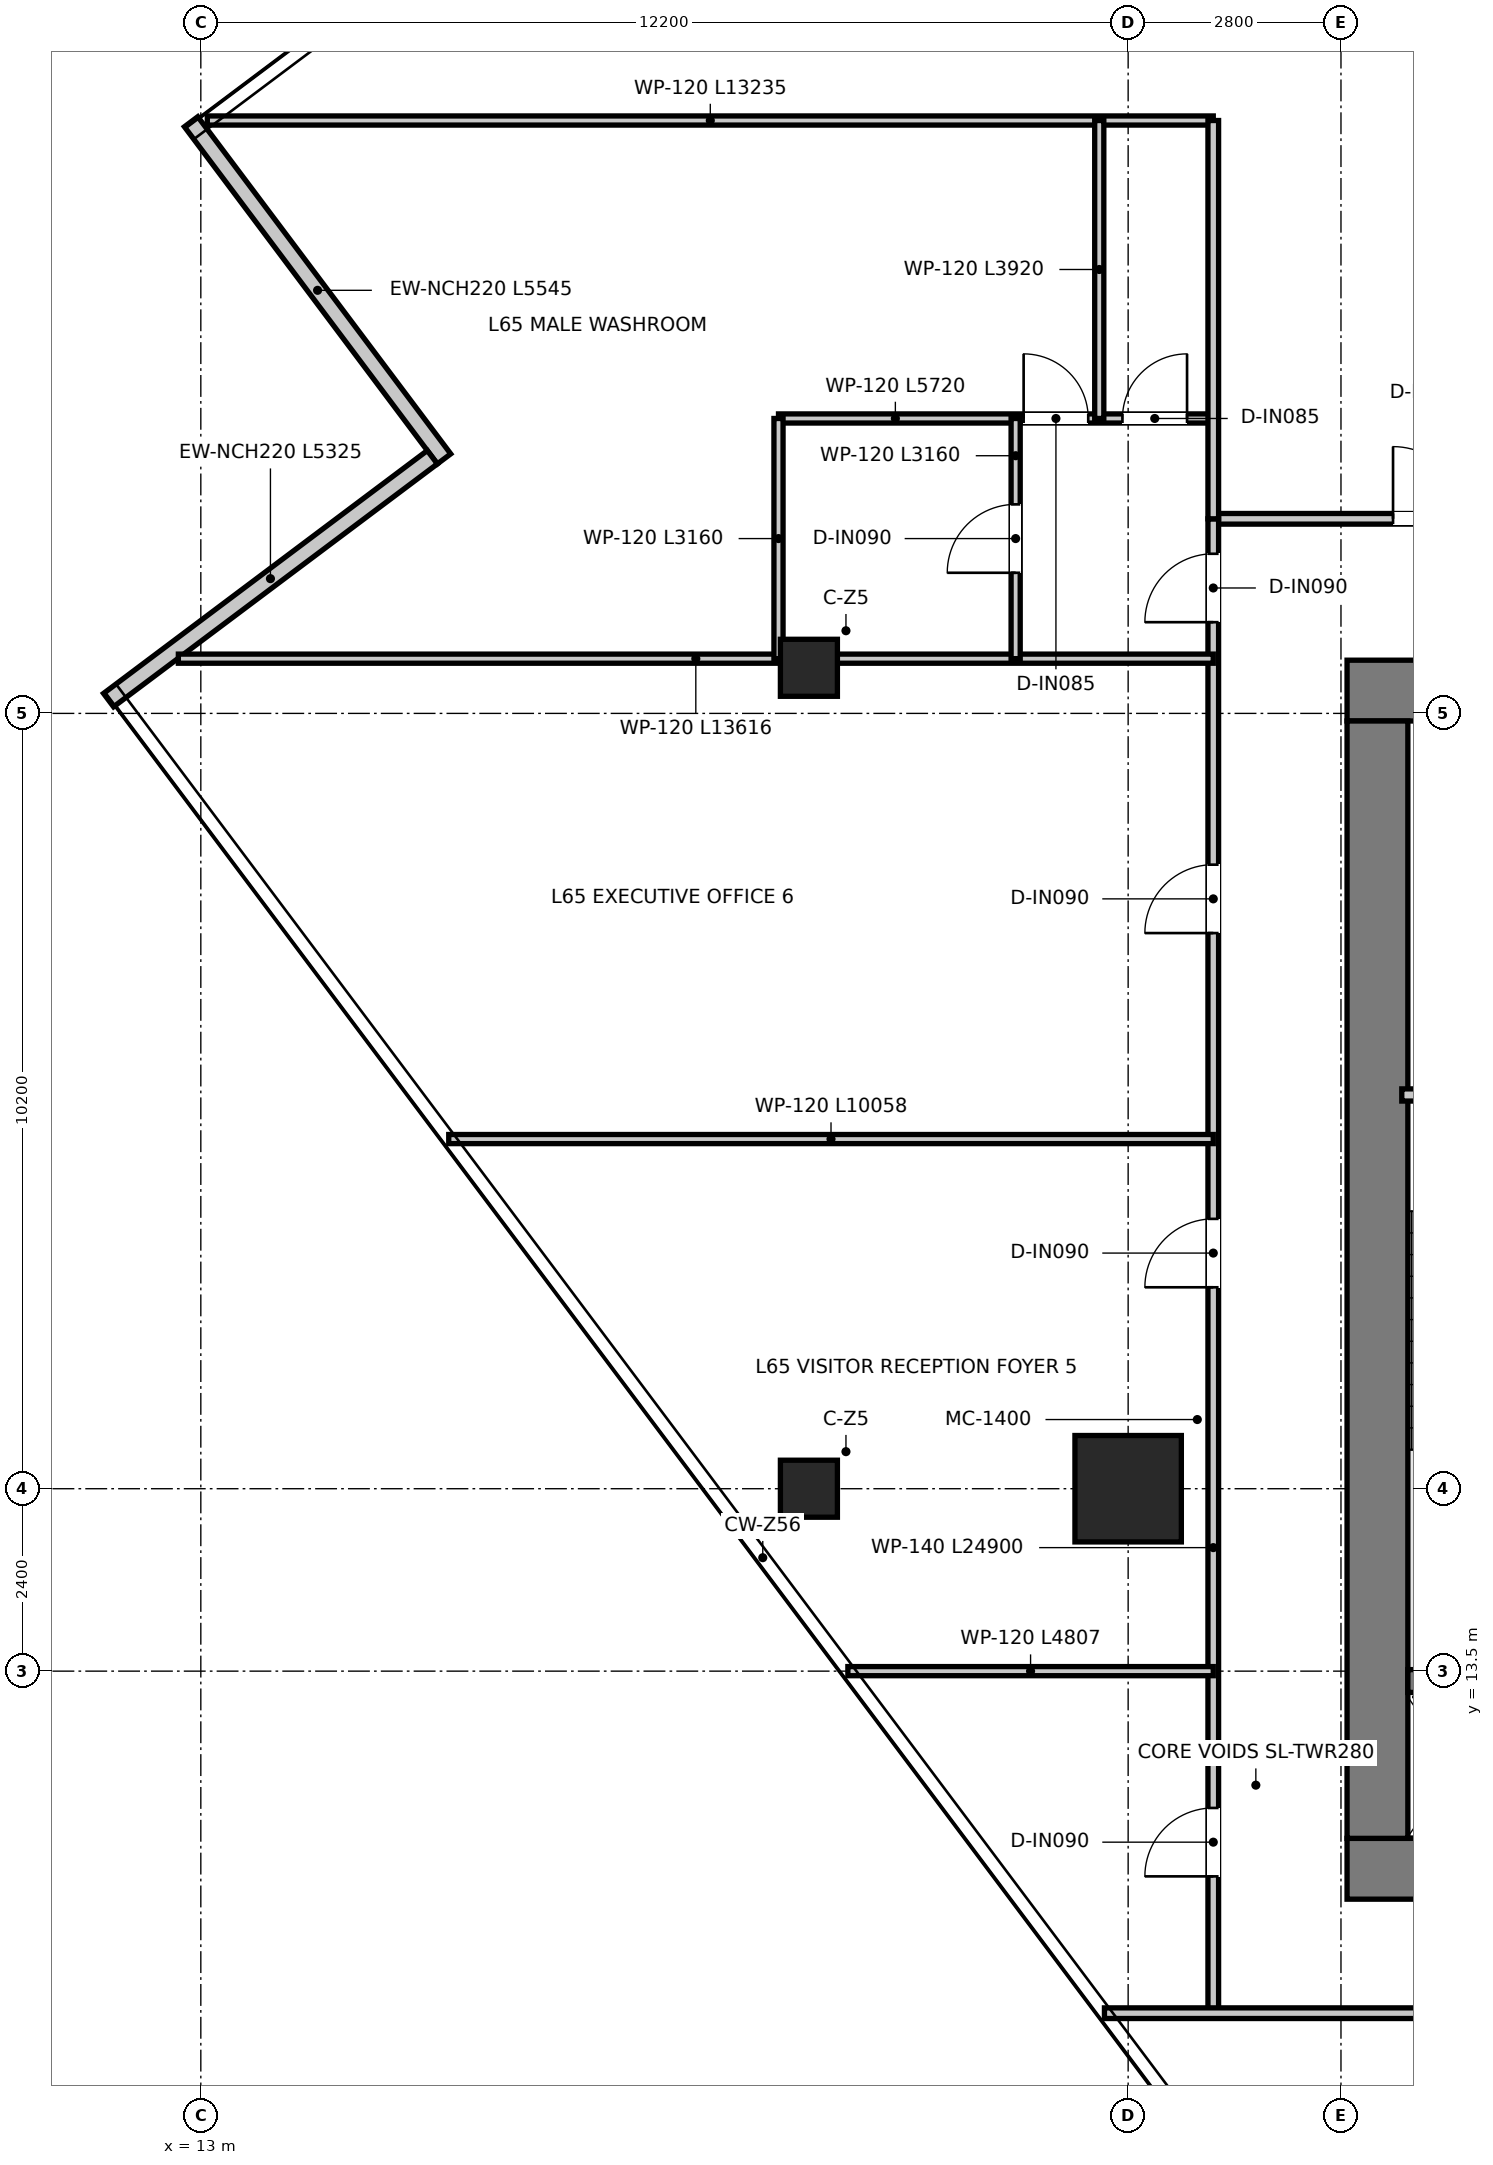
"""IFC4 building model, lengths in metres.
Left out: names, types, materials, properties, quantities, classifications, styles, units other than length and angle.
Written with IfcOpenShell. Run it as: python <this file> out.ifc"""

import sys

from ifc_helpers import new_model, si_unit, direction, frame, frame_2d, origin, origin_2d, place, context, subcontext, project, spatial, rectangle, extrude, source, transform, mapped, element, fill, save


model = new_model("IFC4")
c1 = context("Model", 3, precision=1e-05, world=origin(), true_north=direction((0.0, 1.0)))
c2 = subcontext(c1, "Body", "Model", "MODEL_VIEW")
j1 = project(units=[si_unit("LENGTHUNIT", "METRE"), si_unit("PLANEANGLEUNIT", "RADIAN")], contexts=[c1])
p1 = place(None, origin())
s1 = spatial("IfcSite", under=j1, at=p1, CompositionType="ELEMENT")
p2 = place(p1, origin())
s2 = spatial("IfcBuilding", under=s1, at=p2, CompositionType="ELEMENT")
p3 = place(p2, frame((0.0, 0.0, 267.4)))
s3 = spatial("IfcBuildingStorey", under=s2, at=p3, CompositionType="ELEMENT", Elevation=267.4)
p4 = place(p3, frame((28.08, 10.9, 0.0), z_axis=(0.0, 0.0, 1.0), x_axis=(1.0, 0.0, 0.0)))
e1 = element("IfcWall", 1, at=p4, inside=s3, PredefinedType="SHEAR", context=c2, shape_type="SweptSolid", body=[
    extrude(rectangle(XDim=15.84, YDim=0.8, at=frame_2d((7.92, 0.0))), origin(), (0.0, 0.0, 1.0), 3.95),
])
p5 = place(p3, frame((28.08, 26.4, 0.0), z_axis=(0.0, 0.0, 1.0), x_axis=(1.0, 0.0, 0.0)))
e2 = element("IfcWall", 2, at=p5, inside=s3, PredefinedType="SHEAR", context=c2, shape_type="SweptSolid", body=[
    extrude(rectangle(XDim=15.84, YDim=0.8, at=frame_2d((7.92, 0.0))), origin(), (0.0, 0.0, 1.0), 3.95),
])
p6 = place(p5, frame((7.22, 0.0, 0.0)))
e3 = element("IfcOpeningElement", 3, at=p6, cuts=e2, PredefinedType="OPENING", context=c2, shape_type="SweptSolid", body=[
    extrude(rectangle(XDim=1.4, YDim=2.2, at=frame_2d((0.7, 1.1))), frame((0.0, 0.41, 0.0), z_axis=(0.0, -1.0, 0.0), x_axis=(1.0, 0.0, 0.0)), (0.0, 0.0, 1.0), 0.82),
])
p7 = place(p5, frame((1.775, 0.0, 0.0)))
e4 = element("IfcOpeningElement", 4, at=p7, cuts=e2, PredefinedType="OPENING", context=c2, shape_type="SweptSolid", body=[
    extrude(rectangle(XDim=1.05, YDim=2.1, at=frame_2d((0.525, 1.05))), frame((0.0, 0.41, 0.0), z_axis=(0.0, -1.0, 0.0), x_axis=(1.0, 0.0, 0.0)), (0.0, 0.0, 1.0), 0.82),
])
p8 = place(p5, frame((13.015, 0.0, 0.0)))
e5 = element("IfcOpeningElement", 5, at=p8, cuts=e2, PredefinedType="OPENING", context=c2, shape_type="SweptSolid", body=[
    extrude(rectangle(XDim=1.05, YDim=2.1, at=frame_2d((0.525, 1.05))), frame((0.0, 0.41, 0.0), z_axis=(0.0, -1.0, 0.0), x_axis=(1.0, 0.0, 0.0)), (0.0, 0.0, 1.0), 0.82),
])
p9 = place(p3, frame((28.48, 11.3, 0.0), z_axis=(0.0, 0.0, 1.0), x_axis=(0.0, 1.0, 0.0)))
e6 = element("IfcWall", 6, at=p9, inside=s3, PredefinedType="SHEAR", context=c2, shape_type="SweptSolid", body=[
    extrude(rectangle(XDim=14.7, YDim=0.8, at=frame_2d((7.35, 0.0))), origin(), (0.0, 0.0, 1.0), 3.95),
])
p10 = place(p3, frame((28.88, 13.37, 0.0), z_axis=(0.0, 0.0, 1.0), x_axis=(1.0, 0.0, 0.0)))
e7 = element("IfcWall", 7, at=p10, inside=s3, PredefinedType="SHEAR", context=c2, shape_type="SweptSolid", body=[
    extrude(rectangle(XDim=3.1, YDim=0.3, at=frame_2d((1.55, 0.0))), origin(), (0.0, 0.0, 1.0), 3.95),
])
m1 = source(origin(), c2, "Body", "SweptSolid", [
    extrude(rectangle(XDim=1.4, YDim=1.4, at=origin_2d()), origin(), (0.0, 0.0, 1.0), 3.95),
])
p11 = place(p3, frame((25.2, 15.9, 0.0), z_axis=(0.0, 0.0, 1.0), x_axis=(1.0, 0.0, 0.0)))
e8 = element("IfcColumn", 8, at=p11, inside=s3, PredefinedType="USERDEFINED", context=c2, shape_type="MappedRepresentation", body=[
    mapped(m1, transform((0.0, 0.0, 0.0), x_axis=(1.0, 0.0, 0.0), y_axis=(0.0, 1.0, 0.0), z_axis=(0.0, 0.0, 1.0), scale=1.0)),
])
m2 = source(origin(), c2, "Body", "SweptSolid", [
    extrude(rectangle(XDim=0.75, YDim=0.75, at=origin_2d()), origin(), (0.0, 0.0, 1.0), 3.95),
])
for number, where, z_axis, x_axis in (
    (9, (21.0, 15.9, 0.0), (0.0, 0.0, 1.0), (1.0, 0.0, 0.0)),
    (10, (21.0, 26.7, 0.0), (0.0, 0.0, 1.0), (1.0, 0.0, 0.0)),
):
    element("IfcColumn", number, at=place(p3, frame(where, z_axis=z_axis, x_axis=x_axis)), inside=s3, PredefinedType="COLUMN", context=c2, shape_type="MappedRepresentation", body=[
        mapped(m2, transform((0.0, 0.0, 0.0), x_axis=(1.0, 0.0, 0.0), y_axis=(0.0, 1.0, 0.0), z_axis=(0.0, 0.0, 1.0), scale=1.0)),
    ])
p12 = place(p3, frame((12.872, 33.884, 0.0), z_axis=(0.0, 0.0, 1.0), x_axis=(0.600063399047, -0.799952446789, 0.0)))
e11 = element("IfcWall", 11, at=p12, inside=s3, PredefinedType="ELEMENTEDWALL", context=c2, shape_type="SweptSolid", body=[
    extrude(rectangle(XDim=5.545, YDim=0.22, at=frame_2d((2.772, 0.0))), origin(), (0.0, 0.0, 1.0), 3.67),
])
p13 = place(p3, frame((16.046, 29.47, 0.0), z_axis=(0.0, 0.0, 1.0), x_axis=(-0.799939474344, -0.600080692395, 0.0)))
e12 = element("IfcWall", 12, at=p13, inside=s3, PredefinedType="ELEMENTEDWALL", context=c2, shape_type="SweptSolid", body=[
    extrude(rectangle(XDim=5.325, YDim=0.22, at=frame_2d((2.662, 0.0))), origin(), (0.0, 0.0, 1.0), 3.67),
])
p14 = place(p3, frame((28.8, 21.08, 0.0), z_axis=(0.0, 0.0, 1.0), x_axis=(1.0, 0.0, 0.0)))
e13 = element("IfcWall", 13, at=p14, inside=s3, PredefinedType="PARTITIONING", context=c2, shape_type="SweptSolid", body=[
    extrude(rectangle(XDim=3.16, YDim=0.16, at=frame_2d((1.58, 0.0))), origin(), (0.0, 0.0, 1.0), 3.67),
])
p15 = place(p14, frame((1.055, 0.0, 0.0)))
e14 = element("IfcOpeningElement", 14, at=p15, cuts=e13, PredefinedType="OPENING", context=c2, shape_type="SweptSolid", body=[
    extrude(rectangle(XDim=1.05, YDim=2.1, at=frame_2d((0.525, 1.05))), frame((0.0, 0.09, 0.0), z_axis=(0.0, -1.0, 0.0), x_axis=(1.0, 0.0, 0.0)), (0.0, 0.0, 1.0), 0.18),
])
p16 = place(p3, frame((26.32, 28.66, 0.0), z_axis=(0.0, 0.0, 1.0), x_axis=(1.0, 0.0, 0.0)))
e15 = element("IfcWall", 15, at=p16, inside=s3, PredefinedType="PARTITIONING", context=c2, shape_type="SweptSolid", body=[
    extrude(rectangle(XDim=19.36, YDim=0.14, at=frame_2d((9.68, 0.0))), origin(), (0.0, 0.0, 1.0), 3.18),
])
p17 = place(p16, frame((2.365, 0.0, 0.0)))
e16 = element("IfcOpeningElement", 16, at=p17, cuts=e15, PredefinedType="OPENING", context=c2, shape_type="SweptSolid", body=[
    extrude(rectangle(XDim=0.95, YDim=2.1, at=frame_2d((0.475, 1.05))), frame((0.0, 0.08, 0.0), z_axis=(0.0, -1.0, 0.0), x_axis=(1.0, 0.0, 0.0)), (0.0, 0.0, 1.0), 0.16),
])
p18 = place(p16, frame((9.205, 0.0, 0.0)))
e17 = element("IfcOpeningElement", 17, at=p18, cuts=e15, PredefinedType="OPENING", context=c2, shape_type="SweptSolid", body=[
    extrude(rectangle(XDim=0.95, YDim=2.1, at=frame_2d((0.475, 1.05))), frame((0.0, 0.08, 0.0), z_axis=(0.0, -1.0, 0.0), x_axis=(1.0, 0.0, 0.0)), (0.0, 0.0, 1.0), 0.16),
])
p19 = place(p16, frame((16.045, 0.0, 0.0)))
e18 = element("IfcOpeningElement", 18, at=p19, cuts=e15, PredefinedType="OPENING", context=c2, shape_type="SweptSolid", body=[
    extrude(rectangle(XDim=0.95, YDim=2.1, at=frame_2d((0.475, 1.05))), frame((0.0, 0.08, 0.0), z_axis=(0.0, -1.0, 0.0), x_axis=(1.0, 0.0, 0.0)), (0.0, 0.0, 1.0), 0.16),
])
p20 = place(p3, frame((26.32, 9.0, 0.0), z_axis=(0.0, 0.0, 1.0), x_axis=(0.0, 1.0, 0.0)))
e19 = element("IfcWall", 19, at=p20, inside=s3, PredefinedType="PARTITIONING", context=c2, shape_type="SweptSolid", body=[
    extrude(rectangle(XDim=19.66, YDim=0.14, at=frame_2d((9.83, 0.0))), origin(), (0.0, 0.0, 1.0), 3.13),
])
p21 = place(p20, frame((18.3, 0.0, 0.0)))
e20 = element("IfcOpeningElement", 20, at=p21, cuts=e19, PredefinedType="OPENING", context=c2, shape_type="SweptSolid", body=[
    extrude(rectangle(XDim=0.9, YDim=2.1, at=frame_2d((0.45, 1.05))), frame((0.0, 0.08, 0.0), z_axis=(0.0, -1.0, 0.0), x_axis=(1.0, 0.0, 0.0)), (0.0, 0.0, 1.0), 0.16),
])
p22 = place(p20, frame((1.8, 0.0, 0.0)))
e21 = element("IfcOpeningElement", 21, at=p22, cuts=e19, PredefinedType="OPENING", context=c2, shape_type="SweptSolid", body=[
    extrude(rectangle(XDim=0.9, YDim=2.1, at=frame_2d((0.45, 1.05))), frame((0.0, 0.08, 0.0), z_axis=(0.0, -1.0, 0.0), x_axis=(1.0, 0.0, 0.0)), (0.0, 0.0, 1.0), 0.16),
])
p23 = place(p20, frame((9.55, 0.0, 0.0)))
e22 = element("IfcOpeningElement", 22, at=p23, cuts=e19, PredefinedType="OPENING", context=c2, shape_type="SweptSolid", body=[
    extrude(rectangle(XDim=0.9, YDim=2.1, at=frame_2d((0.45, 1.05))), frame((0.0, 0.08, 0.0), z_axis=(0.0, -1.0, 0.0), x_axis=(1.0, 0.0, 0.0)), (0.0, 0.0, 1.0), 0.16),
])
p24 = place(p20, frame((14.21, 0.0, 0.0)))
e23 = element("IfcOpeningElement", 23, at=p24, cuts=e19, PredefinedType="OPENING", context=c2, shape_type="SweptSolid", body=[
    extrude(rectangle(XDim=0.9, YDim=2.1, at=frame_2d((0.45, 1.05))), frame((0.0, 0.08, 0.0), z_axis=(0.0, -1.0, 0.0), x_axis=(1.0, 0.0, 0.0)), (0.0, 0.0, 1.0), 0.16),
])
p25 = place(p3, frame((24.888, 9.0, 0.0), z_axis=(0.0, 0.0, 1.0), x_axis=(1.0, 0.0, 0.0)))
e24 = element("IfcWall", 24, at=p25, inside=s3, PredefinedType="PARTITIONING", context=c2, shape_type="SweptSolid", body=[
    extrude(rectangle(XDim=20.029, YDim=0.14, at=frame_2d((10.015, 0.0))), origin(), (0.0, 0.0, 1.0), 3.67),
])
p26 = place(p25, frame((10.662, 0.0, 0.0)))
e25 = element("IfcOpeningElement", 25, at=p26, cuts=e24, PredefinedType="OPENING", context=c2, shape_type="SweptSolid", body=[
    extrude(rectangle(XDim=0.9, YDim=2.1, at=frame_2d((0.45, 1.05))), frame((0.0, 0.08, 0.0), z_axis=(0.0, -1.0, 0.0), x_axis=(1.0, 0.0, 0.0)), (0.0, 0.0, 1.0), 0.16),
])
p27 = place(p3, frame((12.704, 26.82, 0.0), z_axis=(0.0, 0.0, 1.0), x_axis=(1.0, 0.0, 0.0)))
e26 = element("IfcWall", 26, at=p27, inside=s3, PredefinedType="PARTITIONING", context=c2, shape_type="SweptSolid", body=[
    extrude(rectangle(XDim=13.616, YDim=0.12, at=frame_2d((6.808, 0.0))), origin(), (0.0, 0.0, 1.0), 3.13),
])
p28 = place(p3, frame((13.085, 33.9, 0.0), z_axis=(0.0, 0.0, 1.0), x_axis=(1.0, 0.0, 0.0)))
e27 = element("IfcWall", 27, at=p28, inside=s3, PredefinedType="PARTITIONING", context=c2, shape_type="SweptSolid", body=[
    extrude(rectangle(XDim=13.235, YDim=0.12, at=frame_2d((6.617, 0.0))), origin(), (0.0, 0.0, 1.0), 3.13),
])
p29 = place(p3, frame((20.6, 29.98, 0.0), z_axis=(0.0, 0.0, 1.0), x_axis=(1.0, 0.0, 0.0)))
e28 = element("IfcWall", 28, at=p29, inside=s3, PredefinedType="PARTITIONING", context=c2, shape_type="SweptSolid", body=[
    extrude(rectangle(XDim=5.72, YDim=0.12, at=frame_2d((2.86, 0.0))), origin(), (0.0, 0.0, 1.0), 3.13),
])
p30 = place(p29, frame((3.225, 0.0, 0.0)))
e29 = element("IfcOpeningElement", 29, at=p30, cuts=e28, PredefinedType="OPENING", context=c2, shape_type="SweptSolid", body=[
    extrude(rectangle(XDim=0.85, YDim=2.1, at=frame_2d((0.425, 1.05))), frame((0.0, 0.07, 0.0), z_axis=(0.0, -1.0, 0.0), x_axis=(1.0, 0.0, 0.0)), (0.0, 0.0, 1.0), 0.14),
])
p31 = place(p29, frame((4.525, 0.0, 0.0)))
e30 = element("IfcOpeningElement", 30, at=p31, cuts=e28, PredefinedType="OPENING", context=c2, shape_type="SweptSolid", body=[
    extrude(rectangle(XDim=0.85, YDim=2.1, at=frame_2d((0.425, 1.05))), frame((0.0, 0.07, 0.0), z_axis=(0.0, -1.0, 0.0), x_axis=(1.0, 0.0, 0.0)), (0.0, 0.0, 1.0), 0.14),
])
p32 = place(p3, frame((20.6, 26.82, 0.0), z_axis=(0.0, 0.0, 1.0), x_axis=(0.0, 1.0, 0.0)))
e31 = element("IfcWall", 31, at=p32, inside=s3, PredefinedType="PARTITIONING", context=c2, shape_type="SweptSolid", body=[
    extrude(rectangle(XDim=3.16, YDim=0.12, at=frame_2d((1.58, 0.0))), origin(), (0.0, 0.0, 1.0), 3.67),
])
p33 = place(p3, frame((23.72, 26.82, 0.0), z_axis=(0.0, 0.0, 1.0), x_axis=(0.0, 1.0, 0.0)))
e32 = element("IfcWall", 32, at=p33, inside=s3, PredefinedType="PARTITIONING", context=c2, shape_type="SweptSolid", body=[
    extrude(rectangle(XDim=3.16, YDim=0.12, at=frame_2d((1.58, 0.0))), origin(), (0.0, 0.0, 1.0), 3.18),
])
p34 = place(p33, frame((1.13, 0.0, 0.0)))
e33 = element("IfcOpeningElement", 33, at=p34, cuts=e32, PredefinedType="OPENING", context=c2, shape_type="SweptSolid", body=[
    extrude(rectangle(XDim=0.9, YDim=2.1, at=frame_2d((0.45, 1.05))), frame((0.0, 0.07, 0.0), z_axis=(0.0, -1.0, 0.0), x_axis=(1.0, 0.0, 0.0)), (0.0, 0.0, 1.0), 0.14),
])
p35 = place(p3, frame((24.82, 29.98, 0.0), z_axis=(0.0, 0.0, 1.0), x_axis=(0.0, 1.0, 0.0)))
e34 = element("IfcWall", 34, at=p35, inside=s3, PredefinedType="PARTITIONING", context=c2, shape_type="SweptSolid", body=[
    extrude(rectangle(XDim=3.92, YDim=0.12, at=frame_2d((1.96, 0.0))), origin(), (0.0, 0.0, 1.0), 3.31),
])
p36 = place(p3, frame((26.32, 28.66, 0.0), z_axis=(0.0, 0.0, 1.0), x_axis=(0.0, 1.0, 0.0)))
e35 = element("IfcWall", 35, at=p36, inside=s3, PredefinedType="PARTITIONING", context=c2, shape_type="SweptSolid", body=[
    extrude(rectangle(XDim=5.24, YDim=0.14, at=frame_2d((2.62, 0.0))), origin(), (0.0, 0.0, 1.0), 3.43),
])
p37 = place(p3, frame((21.513, 13.5, 0.0), z_axis=(0.0, 0.0, 1.0), x_axis=(1.0, 0.0, 0.0)))
e36 = element("IfcWall", 36, at=p37, inside=s3, PredefinedType="PARTITIONING", context=c2, shape_type="SweptSolid", body=[
    extrude(rectangle(XDim=4.807, YDim=0.12, at=frame_2d((2.404, 0.0))), origin(), (0.0, 0.0, 1.0), 3.18),
])
p38 = place(p3, frame((16.262, 20.5, 0.0), z_axis=(0.0, 0.0, 1.0), x_axis=(1.0, 0.0, 0.0)))
e37 = element("IfcWall", 37, at=p38, inside=s3, PredefinedType="PARTITIONING", context=c2, shape_type="SweptSolid", body=[
    extrude(rectangle(XDim=10.058, YDim=0.12, at=frame_2d((5.029, 0.0))), origin(), (0.0, 0.0, 1.0), 3.13),
])
p39 = place(p21, origin())
e38 = element("IfcDoor", 38, at=p39, inside=s3, OperationType="SINGLE_SWING_LEFT", PredefinedType="DOOR", context=c2, shape_type="SweptSolid", body=[
    extrude(rectangle(XDim=0.9, YDim=2.1, at=frame_2d((0.45, 1.05))), frame((0.0, 0.025, 0.0), z_axis=(0.0, -1.0, 0.0), x_axis=(1.0, 0.0, 0.0)), (0.0, 0.0, 1.0), 0.05),
])
fill(e20, e38)
p40 = place(p30, origin())
e39 = element("IfcDoor", 39, at=p40, inside=s3, OperationType="SINGLE_SWING_LEFT", PredefinedType="DOOR", context=c2, shape_type="SweptSolid", body=[
    extrude(rectangle(XDim=0.85, YDim=2.1, at=frame_2d((0.425, 1.05))), frame((0.0, 0.025, 0.0), z_axis=(0.0, -1.0, 0.0), x_axis=(1.0, 0.0, 0.0)), (0.0, 0.0, 1.0), 0.05),
])
fill(e29, e39)
p41 = place(p31, origin())
e40 = element("IfcDoor", 40, at=p41, inside=s3, OperationType="SINGLE_SWING_RIGHT", PredefinedType="DOOR", context=c2, shape_type="SweptSolid", body=[
    extrude(rectangle(XDim=0.85, YDim=2.1, at=frame_2d((0.425, 1.05))), frame((0.0, 0.025, 0.0), z_axis=(0.0, -1.0, 0.0), x_axis=(1.0, 0.0, 0.0)), (0.0, 0.0, 1.0), 0.05),
])
fill(e30, e40)
p42 = place(p34, origin())
e41 = element("IfcDoor", 41, at=p42, inside=s3, OperationType="SINGLE_SWING_LEFT", PredefinedType="DOOR", context=c2, shape_type="SweptSolid", body=[
    extrude(rectangle(XDim=0.9, YDim=2.1, at=frame_2d((0.45, 1.05))), frame((0.0, 0.025, 0.0), z_axis=(0.0, -1.0, 0.0), x_axis=(1.0, 0.0, 0.0)), (0.0, 0.0, 1.0), 0.05),
])
fill(e33, e41)
p43 = place(p17, origin())
e42 = element("IfcDoor", 42, at=p43, inside=s3, OperationType="SINGLE_SWING_LEFT", PredefinedType="DOOR", context=c2, shape_type="SweptSolid", body=[
    extrude(rectangle(XDim=0.95, YDim=2.1, at=frame_2d((0.475, 1.05))), frame((0.0, 0.025, 0.0), z_axis=(0.0, -1.0, 0.0), x_axis=(1.0, 0.0, 0.0)), (0.0, 0.0, 1.0), 0.05),
])
fill(e16, e42)
p44 = place(p22, origin())
e43 = element("IfcDoor", 43, at=p44, inside=s3, OperationType="SINGLE_SWING_LEFT", PredefinedType="DOOR", context=c2, shape_type="SweptSolid", body=[
    extrude(rectangle(XDim=0.9, YDim=2.1, at=frame_2d((0.45, 1.05))), frame((0.0, 0.025, 0.0), z_axis=(0.0, -1.0, 0.0), x_axis=(1.0, 0.0, 0.0)), (0.0, 0.0, 1.0), 0.05),
])
fill(e21, e43)
p45 = place(p23, origin())
e44 = element("IfcDoor", 44, at=p45, inside=s3, OperationType="SINGLE_SWING_LEFT", PredefinedType="DOOR", context=c2, shape_type="SweptSolid", body=[
    extrude(rectangle(XDim=0.9, YDim=2.1, at=frame_2d((0.45, 1.05))), frame((0.0, 0.025, 0.0), z_axis=(0.0, -1.0, 0.0), x_axis=(1.0, 0.0, 0.0)), (0.0, 0.0, 1.0), 0.05),
])
fill(e22, e44)
p46 = place(p24, origin())
e45 = element("IfcDoor", 45, at=p46, inside=s3, OperationType="SINGLE_SWING_LEFT", PredefinedType="DOOR", context=c2, shape_type="SweptSolid", body=[
    extrude(rectangle(XDim=0.9, YDim=2.1, at=frame_2d((0.45, 1.05))), frame((0.0, 0.025, 0.0), z_axis=(0.0, -1.0, 0.0), x_axis=(1.0, 0.0, 0.0)), (0.0, 0.0, 1.0), 0.05),
])
fill(e23, e45)
save(model, sys.argv[1])
